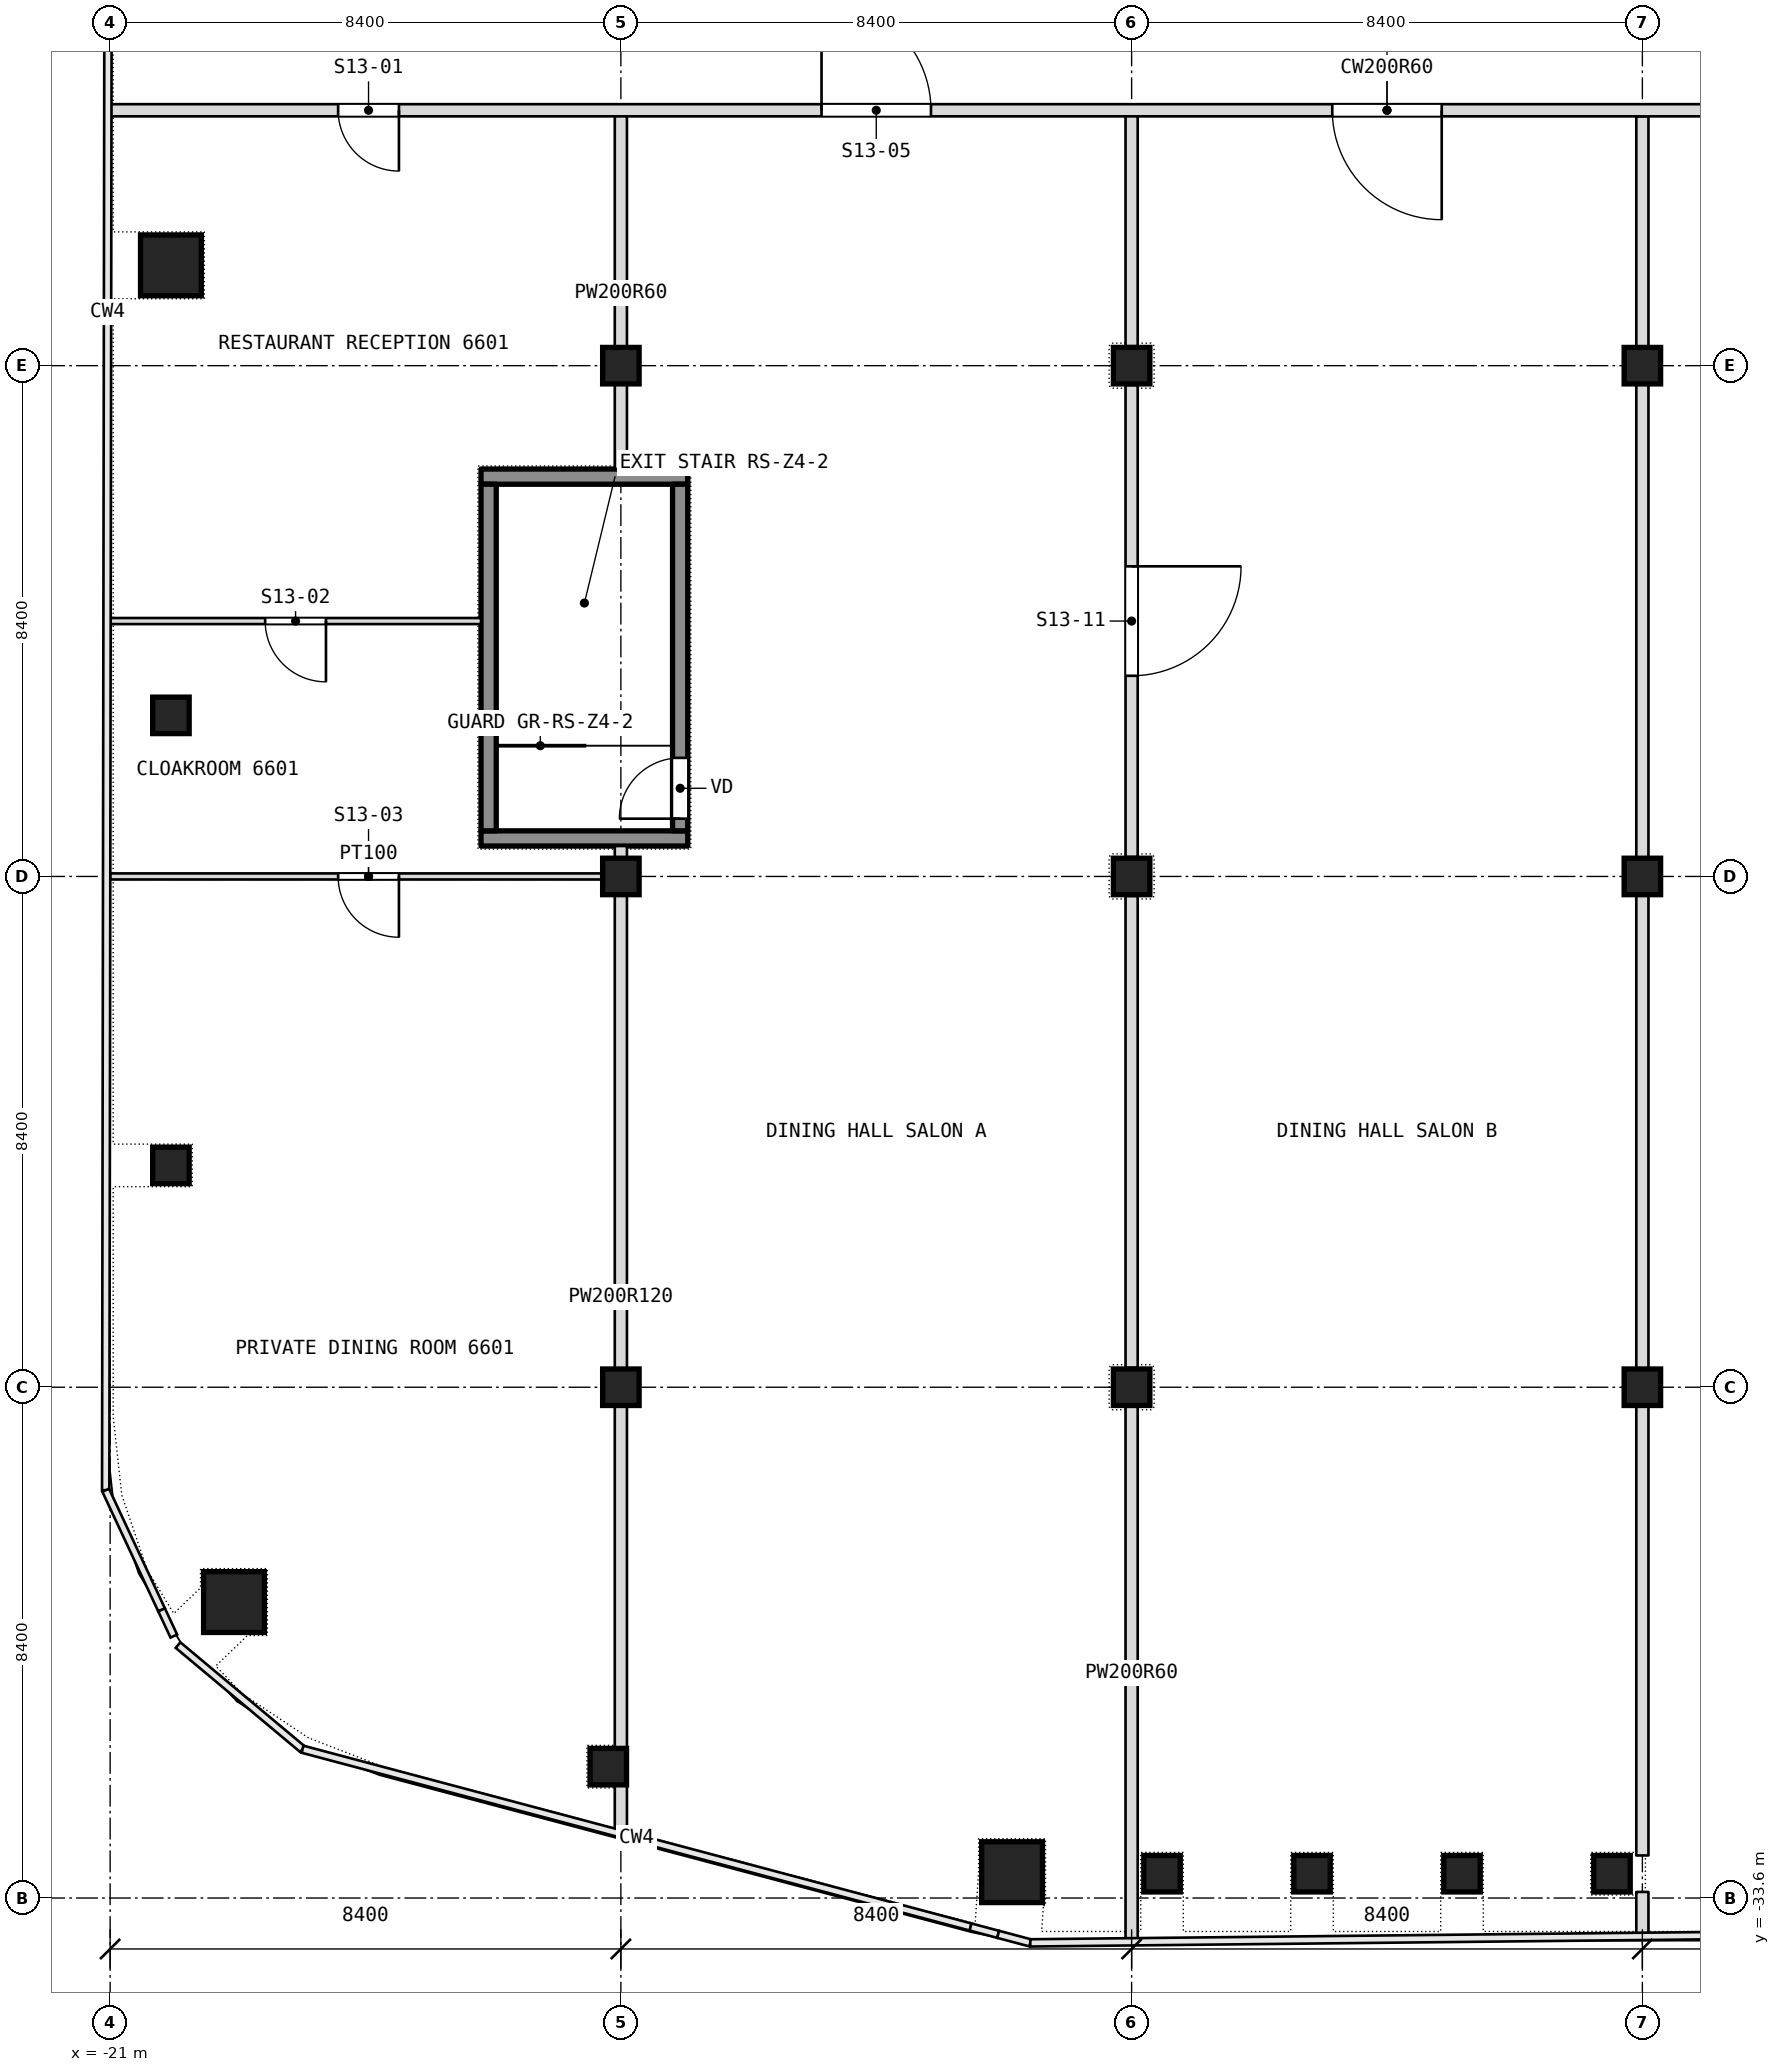
"""IFC4 building model, lengths in metres.
Left out: names, types, materials, properties, quantities, classifications, styles, units other than length and angle.
Written with IfcOpenShell. Run it as: python <this file> out.ifc"""

import sys

from ifc_helpers import new_model, si_unit, direction, frame, frame_2d, origin, origin_2d, place, context, subcontext, project, spatial, rectangle, extrude, element, fill, save


model = new_model("IFC4")
c1 = context("Model", 3, precision=1e-05, world=origin(), true_north=direction((0.0, 1.0)))
c2 = subcontext(c1, "Body", "Model", "MODEL_VIEW")
j1 = project(units=[si_unit("LENGTHUNIT", "METRE"), si_unit("PLANEANGLEUNIT", "RADIAN")], contexts=[c1])
p1 = place(None, origin())
s1 = spatial("IfcSite", under=j1, at=p1, CompositionType="ELEMENT")
p2 = place(p1, origin())
s2 = spatial("IfcBuilding", under=s1, at=p2, CompositionType="ELEMENT")
p3 = place(p2, frame((0.0, 0.0, 288.5)))
s3 = spatial("IfcBuildingStorey", under=s2, at=p3, CompositionType="ELEMENT", Elevation=288.5)
for number, where, z_axis, x_axis in (
    (1, (-18.963, -28.733, 0.0), (0.0, 0.0, 1.0), (1.0, 0.0, 0.0)),
    (2, (-6.166, -33.175, 0.0), (0.0, 0.0, 1.0), (1.0, 0.0, 0.0)),
    (3, (-20.0, -6.75, 0.0), (0.0, 0.0, 1.0), (1.0, 0.0, 0.0)),
):
    element("IfcColumn", number, at=place(p3, frame(where, z_axis=z_axis, x_axis=x_axis)), inside=s3, PredefinedType="COLUMN", context=c2, shape_type="SweptSolid", body=[
        extrude(rectangle(XDim=1.0, YDim=1.0, at=origin_2d()), origin(), (0.0, 0.0, 1.0), 6.9),
    ])
for number, where, z_axis, x_axis in (
    (4, (-12.6, -25.2, 0.0), (0.0, 0.0, 1.0), (1.0, 0.0, 0.0)),
    (5, (-12.6, -16.8, 0.0), (0.0, 0.0, 1.0), (1.0, 0.0, 0.0)),
    (6, (-12.6, -8.4, 0.0), (0.0, 0.0, 1.0), (1.0, 0.0, 0.0)),
    (7, (-4.2, -25.2, 0.0), (0.0, 0.0, 1.0), (1.0, 0.0, 0.0)),
    (8, (-4.2, -16.8, 0.0), (0.0, 0.0, 1.0), (1.0, 0.0, 0.0)),
    (9, (-4.2, -8.4, 0.0), (0.0, 0.0, 1.0), (1.0, 0.0, 0.0)),
    (10, (4.2, -25.2, 0.0), (0.0, 0.0, 1.0), (1.0, 0.0, 0.0)),
    (11, (4.2, -16.8, 0.0), (0.0, 0.0, 1.0), (1.0, 0.0, 0.0)),
    (12, (4.2, -8.4, 0.0), (0.0, 0.0, 1.0), (1.0, 0.0, 0.0)),
    (13, (-20.0, -21.552, 0.0), (0.0, 0.0, 1.0), (1.0, 0.0, 0.0)),
    (14, (-20.0, -14.151, 0.0), (0.0, 0.0, 1.0), (1.0, 0.0, 0.0)),
    (15, (3.7, -33.2, 0.0), (0.0, 0.0, 1.0), (1.0, 0.0, 0.0)),
    (16, (1.233, -33.2, 0.0), (0.0, 0.0, 1.0), (1.0, 0.0, 0.0)),
    (17, (-1.233, -33.2, 0.0), (0.0, 0.0, 1.0), (1.0, 0.0, 0.0)),
    (18, (-3.7, -33.2, 0.0), (0.0, 0.0, 1.0), (1.0, 0.0, 0.0)),
    (19, (-12.807, -31.439, 0.0), (0.0, 0.0, 1.0), (1.0, 0.0, 0.0)),
):
    element("IfcColumn", number, at=place(p3, frame(where, z_axis=z_axis, x_axis=x_axis)), inside=s3, PredefinedType="COLUMN", context=c2, shape_type="SweptSolid", body=[
        extrude(rectangle(XDim=0.6, YDim=0.6, at=origin_2d()), origin(), (0.0, 0.0, 1.0), 6.9),
    ])
p4 = place(p3, frame((-21.0, -16.8, 0.0), z_axis=(0.0, 0.0, 1.0), x_axis=(1.0, 0.0, 0.0)))
e20 = element("IfcWall", 20, at=p4, inside=s3, PredefinedType="PARTITIONING", context=c2, shape_type="SweptSolid", body=[
    extrude(rectangle(XDim=8.5, YDim=0.1, at=frame_2d((4.25, 0.0))), origin(), (0.0, 0.0, 1.0), 6.56),
])
p5 = place(p4, frame((3.75, 0.0, 0.0)))
e21 = element("IfcOpeningElement", 21, at=p5, cuts=e20, PredefinedType="OPENING", context=c2, shape_type="SweptSolid", body=[
    extrude(rectangle(XDim=1.0, YDim=2.1, at=frame_2d((0.5, 1.05))), frame((0.0, 0.05, 0.0), z_axis=(0.0, -1.0, 0.0), x_axis=(1.0, 0.0, 0.0)), (0.0, 0.0, 1.0), 0.1),
])
p6 = place(p3, frame((-21.0, -12.6, 0.0), z_axis=(0.0, 0.0, 1.0), x_axis=(1.0, 0.0, 0.0)))
e22 = element("IfcWall", 22, at=p6, inside=s3, PredefinedType="PARTITIONING", context=c2, shape_type="SweptSolid", body=[
    extrude(rectangle(XDim=6.1, YDim=0.1, at=frame_2d((3.05, 0.0))), origin(), (0.0, 0.0, 1.0), 6.9),
])
p7 = place(p6, frame((2.55, 0.0, 0.0)))
e23 = element("IfcOpeningElement", 23, at=p7, cuts=e22, PredefinedType="OPENING", context=c2, shape_type="SweptSolid", body=[
    extrude(rectangle(XDim=1.0, YDim=2.1, at=frame_2d((0.5, 1.05))), frame((0.0, 0.05, 0.0), z_axis=(0.0, -1.0, 0.0), x_axis=(1.0, 0.0, 0.0)), (0.0, 0.0, 1.0), 0.1),
])
p8 = place(p3, frame((4.2, -34.2, 0.0), z_axis=(0.0, 0.0, 1.0), x_axis=(0.0, 1.0, 0.0)))
e24 = element("IfcWall", 24, at=p8, inside=s3, PredefinedType="PARTITIONING", context=c2, shape_type="SweptSolid", body=[
    extrude(rectangle(XDim=0.7, YDim=0.2, at=frame_2d((0.35, 0.0))), origin(), (0.0, 0.0, 1.0), 6.9),
])
p9 = place(p3, frame((4.2, -32.9, 0.0), z_axis=(0.0, 0.0, 1.0), x_axis=(0.0, 1.0, 0.0)))
e25 = element("IfcWall", 25, at=p9, inside=s3, PredefinedType="PARTITIONING", context=c2, shape_type="SweptSolid", body=[
    extrude(rectangle(XDim=28.6, YDim=0.2, at=frame_2d((14.3, 0.0))), origin(), (0.0, 0.0, 1.0), 6.9),
])
p10 = place(p3, frame((-21.0, -4.2, 0.0), z_axis=(0.0, 0.0, 1.0), x_axis=(1.0, 0.0, 0.0)))
e26 = element("IfcWall", 26, at=p10, inside=s3, PredefinedType="PARTITIONING", context=c2, shape_type="SweptSolid", body=[
    extrude(rectangle(XDim=42.0, YDim=0.2, at=frame_2d((21.0, 0.0))), origin(), (0.0, 0.0, 1.0), 6.9),
])
p11 = place(p10, frame((3.75, 0.0, 0.0)))
e27 = element("IfcOpeningElement", 27, at=p11, cuts=e26, PredefinedType="OPENING", context=c2, shape_type="SweptSolid", body=[
    extrude(rectangle(XDim=1.0, YDim=2.1, at=frame_2d((0.5, 1.05))), frame((0.0, 0.1, 0.0), z_axis=(0.0, -1.0, 0.0), x_axis=(1.0, 0.0, 0.0)), (0.0, 0.0, 1.0), 0.2),
])
p12 = place(p10, frame((20.1, 0.0, 0.0)))
e28 = element("IfcOpeningElement", 28, at=p12, cuts=e26, PredefinedType="OPENING", context=c2, shape_type="SweptSolid", body=[
    extrude(rectangle(XDim=1.8, YDim=2.1, at=frame_2d((0.9, 1.05))), frame((0.0, 0.1, 0.0), z_axis=(0.0, -1.0, 0.0), x_axis=(1.0, 0.0, 0.0)), (0.0, 0.0, 1.0), 0.2),
])
p13 = place(p10, frame((11.7, 0.0, 0.0)))
e29 = element("IfcOpeningElement", 29, at=p13, cuts=e26, PredefinedType="OPENING", context=c2, shape_type="SweptSolid", body=[
    extrude(rectangle(XDim=1.8, YDim=2.1, at=frame_2d((0.9, 1.05))), frame((0.0, 0.1, 0.0), z_axis=(0.0, -1.0, 0.0), x_axis=(1.0, 0.0, 0.0)), (0.0, 0.0, 1.0), 0.2),
])
p14 = place(p10, frame((28.5, 0.0, 0.0)))
e30 = element("IfcOpeningElement", 30, at=p14, cuts=e26, PredefinedType="OPENING", context=c2, shape_type="SweptSolid", body=[
    extrude(rectangle(XDim=1.8, YDim=2.1, at=frame_2d((0.9, 1.05))), frame((0.0, 0.1, 0.0), z_axis=(0.0, -1.0, 0.0), x_axis=(1.0, 0.0, 0.0)), (0.0, 0.0, 1.0), 0.2),
])
p15 = place(p10, frame((37.25, 0.0, 0.0)))
e31 = element("IfcOpeningElement", 31, at=p15, cuts=e26, PredefinedType="OPENING", context=c2, shape_type="SweptSolid", body=[
    extrude(rectangle(XDim=1.0, YDim=2.1, at=frame_2d((0.5, 1.05))), frame((0.0, 0.1, 0.0), z_axis=(0.0, -1.0, 0.0), x_axis=(1.0, 0.0, 0.0)), (0.0, 0.0, 1.0), 0.2),
])
p16 = place(p3, frame((-4.2, -34.29, 0.0), z_axis=(0.0, 0.0, 1.0), x_axis=(0.0, 1.0, 0.0)))
e32 = element("IfcWall", 32, at=p16, inside=s3, PredefinedType="PARTITIONING", context=c2, shape_type="SweptSolid", body=[
    extrude(rectangle(XDim=8.77, YDim=0.2, at=frame_2d((4.385, 0.0))), origin(), (0.0, 0.0, 1.0), 6.9),
])
p17 = place(p3, frame((-4.2, -24.88, 0.0), z_axis=(0.0, 0.0, 1.0), x_axis=(0.0, 1.0, 0.0)))
e33 = element("IfcWall", 33, at=p17, inside=s3, PredefinedType="PARTITIONING", context=c2, shape_type="SweptSolid", body=[
    extrude(rectangle(XDim=7.76, YDim=0.2, at=frame_2d((3.88, 0.0))), origin(), (0.0, 0.0, 1.0), 6.9),
])
p18 = place(p3, frame((-4.2, -16.48, 0.0), z_axis=(0.0, 0.0, 1.0), x_axis=(0.0, 1.0, 0.0)))
e34 = element("IfcWall", 34, at=p18, inside=s3, PredefinedType="PARTITIONING", context=c2, shape_type="SweptSolid", body=[
    extrude(rectangle(XDim=7.76, YDim=0.2, at=frame_2d((3.88, 0.0))), origin(), (0.0, 0.0, 1.0), 6.9),
])
p19 = place(p18, frame((2.98, 0.0, 0.0)))
e35 = element("IfcOpeningElement", 35, at=p19, cuts=e34, PredefinedType="OPENING", context=c2, shape_type="SweptSolid", body=[
    extrude(rectangle(XDim=1.8, YDim=2.1, at=frame_2d((0.9, 1.05))), frame((0.0, 0.1, 0.0), z_axis=(0.0, -1.0, 0.0), x_axis=(1.0, 0.0, 0.0)), (0.0, 0.0, 1.0), 0.2),
])
p20 = place(p3, frame((-4.2, -8.08, 0.0), z_axis=(0.0, 0.0, 1.0), x_axis=(0.0, 1.0, 0.0)))
e36 = element("IfcWall", 36, at=p20, inside=s3, PredefinedType="PARTITIONING", context=c2, shape_type="SweptSolid", body=[
    extrude(rectangle(XDim=3.78, YDim=0.2, at=frame_2d((1.89, 0.0))), origin(), (0.0, 0.0, 1.0), 6.9),
])
p21 = place(p3, frame((-12.6, -32.529, 0.0), z_axis=(0.0, 0.0, 1.0), x_axis=(0.0, 1.0, 0.0)))
e37 = element("IfcWall", 37, at=p21, inside=s3, PredefinedType="PARTITIONING", context=c2, shape_type="SweptSolid", body=[
    extrude(rectangle(XDim=0.79, YDim=0.2, at=frame_2d((0.395, 0.0))), origin(), (0.0, 0.0, 1.0), 6.9),
])
p22 = place(p3, frame((-12.6, -31.139, 0.0), z_axis=(0.0, 0.0, 1.0), x_axis=(0.0, 1.0, 0.0)))
e38 = element("IfcWall", 38, at=p22, inside=s3, PredefinedType="PARTITIONING", context=c2, shape_type="SweptSolid", body=[
    extrude(rectangle(XDim=14.839, YDim=0.2, at=frame_2d((7.419, 0.0))), origin(), (0.0, 0.0, 1.0), 6.9),
])
p23 = place(p3, frame((-12.6, -10.1, 0.0), z_axis=(0.0, 0.0, 1.0), x_axis=(0.0, 1.0, 0.0)))
e39 = element("IfcWall", 39, at=p23, inside=s3, PredefinedType="PARTITIONING", context=c2, shape_type="SweptSolid", body=[
    extrude(rectangle(XDim=5.8, YDim=0.2, at=frame_2d((2.9, 0.0))), origin(), (0.0, 0.0, 1.0), 6.9),
])
for number, where, z_axis, x_axis in (
    (40, (-14.9, -16.175, 0.1), (0.0, 0.0, 1.0), (1.0, 0.0, 0.0)),
    (41, (-14.9, -10.225, 0.1), (0.0, 0.0, 1.0), (1.0, 0.0, 0.0)),
):
    element("IfcWall", number, at=place(p3, frame(where, z_axis=z_axis, x_axis=x_axis)), inside=s3, PredefinedType="SHEAR", context=c2, shape_type="SweptSolid", body=[
        extrude(rectangle(XDim=3.4, YDim=0.25, at=frame_2d((1.7, 0.0))), origin(), (0.0, 0.0, 1.0), 6.8),
    ])
p24 = place(p3, frame((-14.775, -16.05, 0.1), z_axis=(0.0, 0.0, 1.0), x_axis=(0.0, 1.0, 0.0)))
e42 = element("IfcWall", 42, at=p24, inside=s3, PredefinedType="SHEAR", context=c2, shape_type="SweptSolid", body=[
    extrude(rectangle(XDim=5.7, YDim=0.25, at=frame_2d((2.85, 0.0))), origin(), (0.0, 0.0, 1.0), 6.8),
])
p25 = place(p3, frame((-11.625, -16.05, 0.1), z_axis=(0.0, 0.0, 1.0), x_axis=(0.0, 1.0, 0.0)))
e43 = element("IfcWall", 43, at=p25, inside=s3, PredefinedType="SHEAR", context=c2, shape_type="SweptSolid", body=[
    extrude(rectangle(XDim=5.7, YDim=0.25, at=frame_2d((2.85, 0.0))), origin(), (0.0, 0.0, 1.0), 6.8),
])
p26 = place(p25, frame((0.2, 0.0, 0.0)))
e44 = element("IfcOpeningElement", 44, at=p26, cuts=e43, PredefinedType="OPENING", context=c2, shape_type="SweptSolid", body=[
    extrude(rectangle(XDim=1.0, YDim=2.1, at=frame_2d((0.5, 1.05))), frame((0.0, 0.125, 0.0), z_axis=(0.0, -1.0, 0.0), x_axis=(1.0, 0.0, 0.0)), (0.0, 0.0, 1.0), 0.25),
])
p27 = place(p5, origin())
e45 = element("IfcDoor", 45, at=p27, inside=s3, OperationType="SINGLE_SWING_LEFT", PredefinedType="DOOR", context=c2, shape_type="SweptSolid", body=[
    extrude(rectangle(XDim=1.0, YDim=2.1, at=frame_2d((0.5, 1.05))), frame((0.0, 0.025, 0.0), z_axis=(0.0, -1.0, 0.0), x_axis=(1.0, 0.0, 0.0)), (0.0, 0.0, 1.0), 0.05),
])
fill(e21, e45)
p28 = place(p7, origin())
e46 = element("IfcDoor", 46, at=p28, inside=s3, OperationType="SINGLE_SWING_RIGHT", PredefinedType="DOOR", context=c2, shape_type="SweptSolid", body=[
    extrude(rectangle(XDim=1.0, YDim=2.1, at=frame_2d((0.5, 1.05))), frame((0.0, 0.025, 0.0), z_axis=(0.0, -1.0, 0.0), x_axis=(1.0, 0.0, 0.0)), (0.0, 0.0, 1.0), 0.05),
])
fill(e23, e46)
p29 = place(p11, origin())
e47 = element("IfcDoor", 47, at=p29, inside=s3, OperationType="SINGLE_SWING_LEFT", PredefinedType="DOOR", context=c2, shape_type="SweptSolid", body=[
    extrude(rectangle(XDim=1.0, YDim=2.1, at=frame_2d((0.5, 1.05))), frame((0.0, 0.025, 0.0), z_axis=(0.0, -1.0, 0.0), x_axis=(1.0, 0.0, 0.0)), (0.0, 0.0, 1.0), 0.05),
])
fill(e27, e47)
p30 = place(p12, origin())
e48 = element("IfcDoor", 48, at=p30, inside=s3, OperationType="DOUBLE_DOOR_SINGLE_SWING", PredefinedType="DOOR", context=c2, shape_type="SweptSolid", body=[
    extrude(rectangle(XDim=1.8, YDim=2.1, at=frame_2d((0.9, 1.05))), frame((0.0, 0.025, 0.0), z_axis=(0.0, -1.0, 0.0), x_axis=(1.0, 0.0, 0.0)), (0.0, 0.0, 1.0), 0.05),
])
fill(e28, e48)
p31 = place(p13, origin())
e49 = element("IfcDoor", 49, at=p31, inside=s3, OperationType="DOUBLE_DOOR_SINGLE_SWING", PredefinedType="DOOR", context=c2, shape_type="SweptSolid", body=[
    extrude(rectangle(XDim=1.8, YDim=2.1, at=frame_2d((0.9, 1.05))), frame((0.0, 0.025, 0.0), z_axis=(0.0, -1.0, 0.0), x_axis=(1.0, 0.0, 0.0)), (0.0, 0.0, 1.0), 0.05),
])
fill(e29, e49)
p32 = place(p19, origin())
e50 = element("IfcDoor", 50, at=p32, inside=s3, OperationType="DOUBLE_DOOR_SINGLE_SWING", PredefinedType="DOOR", context=c2, shape_type="SweptSolid", body=[
    extrude(rectangle(XDim=1.8, YDim=2.1, at=frame_2d((0.9, 1.05))), frame((0.0, 0.025, 0.0), z_axis=(0.0, -1.0, 0.0), x_axis=(1.0, 0.0, 0.0)), (0.0, 0.0, 1.0), 0.05),
])
fill(e35, e50)
p33 = place(p26, origin())
e51 = element("IfcDoor", 51, at=p33, inside=s3, OperationType="SINGLE_SWING_LEFT", PredefinedType="DOOR", context=c2, shape_type="SweptSolid", body=[
    extrude(rectangle(XDim=1.0, YDim=2.1, at=frame_2d((0.5, 1.05))), frame((0.0, 0.025, 0.0), z_axis=(0.0, -1.0, 0.0), x_axis=(1.0, 0.0, 0.0)), (0.0, 0.0, 1.0), 0.05),
])
fill(e44, e51)
save(model, sys.argv[1])
